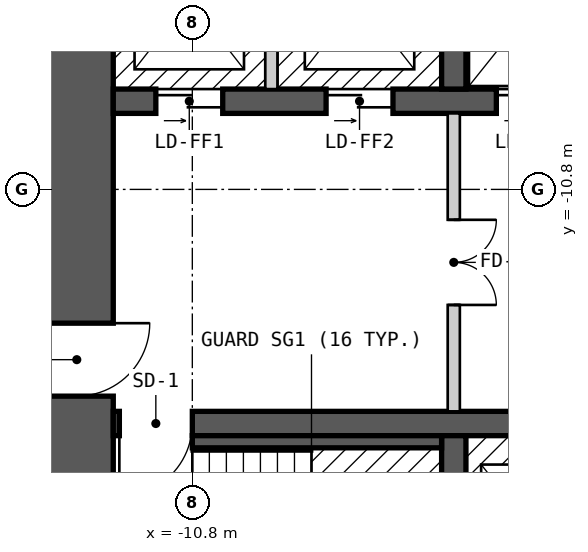
"""IFC4 building model, lengths in metres.
Left out: names, types, materials, properties, quantities, classifications, styles, units other than length and angle.
Written with IfcOpenShell. Run it as: python <this file> out.ifc"""

import sys

from ifc_helpers import new_model, si_unit, direction, frame, frame_2d, origin, place, context, subcontext, project, spatial, rectangle, extrude, element, fill, save


model = new_model("IFC4")
c1 = context("Model", 3, precision=1e-05, world=origin(), true_north=direction((0.0, 1.0)))
c2 = subcontext(c1, "Body", "Model", "MODEL_VIEW")
j1 = project(units=[si_unit("LENGTHUNIT", "METRE"), si_unit("PLANEANGLEUNIT", "RADIAN")], contexts=[c1])
p1 = place(None, origin())
s1 = spatial("IfcSite", under=j1, at=p1, CompositionType="ELEMENT")
p2 = place(p1, origin())
s2 = spatial("IfcBuilding", under=s1, at=p2, CompositionType="ELEMENT")
p3 = place(p2, frame((0.0, 0.0, 56.4)))
s3 = spatial("IfcBuildingStorey", under=s2, at=p3, CompositionType="ELEMENT", Elevation=56.4)
p4 = place(p3, frame((-12.7, -17.8, 0.0), z_axis=(0.0, 0.0, 1.0), x_axis=(0.0, 1.0, 0.0)))
e1 = element("IfcWall", 1, at=p4, inside=s3, PredefinedType="SHEAR", context=c2, shape_type="SweptSolid", body=[
    extrude(rectangle(XDim=11.6, YDim=1.2, at=frame_2d((5.8, 0.0))), origin(), (0.0, 0.0, 1.0), 2.7),
])
p5 = place(p4, frame((3.6, 0.0, 0.0)))
e2 = element("IfcOpeningElement", 2, at=p5, cuts=e1, PredefinedType="OPENING", context=c2, shape_type="SweptSolid", body=[
    extrude(rectangle(XDim=1.2, YDim=2.1, at=frame_2d((0.6, 1.05))), frame((0.0, 0.61, 0.0), z_axis=(0.0, -1.0, 0.0), x_axis=(1.0, 0.0, 0.0)), (0.0, 0.0, 1.0), 1.22),
])
p6 = place(p3, frame((-12.1, -14.65, 0.0), z_axis=(0.0, 0.0, 1.0), x_axis=(1.0, 0.0, 0.0)))
e3 = element("IfcWall", 3, at=p6, inside=s3, PredefinedType="SHEAR", context=c2, shape_type="SweptSolid", body=[
    extrude(rectangle(XDim=24.2, YDim=0.4, at=frame_2d((12.1, 0.0))), origin(), (0.0, 0.0, 1.0), 2.7),
])
p7 = place(p6, frame((1.3, 0.0, 0.0), z_axis=(0.0, 0.0, 1.0), x_axis=(-1.0, 0.0, 0.0)))
e4 = element("IfcOpeningElement", 4, at=p7, cuts=e3, PredefinedType="OPENING", context=c2, shape_type="SweptSolid", body=[
    extrude(rectangle(XDim=1.2, YDim=2.1, at=frame_2d((0.6, 1.05))), frame((0.0, 0.21, 0.0), z_axis=(0.0, -1.0, 0.0), x_axis=(1.0, 0.0, 0.0)), (0.0, 0.0, 1.0), 0.42),
])
p8 = place(p6, frame((24.15, 0.0, 0.0), z_axis=(0.0, 0.0, 1.0), x_axis=(-1.0, 0.0, 0.0)))
e5 = element("IfcOpeningElement", 5, at=p8, cuts=e3, PredefinedType="OPENING", context=c2, shape_type="SweptSolid", body=[
    extrude(rectangle(XDim=1.2, YDim=2.1, at=frame_2d((0.6, 1.05))), frame((0.0, 0.21, 0.0), z_axis=(0.0, -1.0, 0.0), x_axis=(1.0, 0.0, 0.0)), (0.0, 0.0, 1.0), 0.42),
])
p9 = place(p6, frame((16.6, 0.0, 0.0), z_axis=(0.0, 0.0, 1.0), x_axis=(-1.0, 0.0, 0.0)))
e6 = element("IfcOpeningElement", 6, at=p9, cuts=e3, PredefinedType="OPENING", context=c2, shape_type="SweptSolid", body=[
    extrude(rectangle(XDim=1.0, YDim=2.1, at=frame_2d((0.5, 1.05))), frame((0.0, 0.21, 0.0), z_axis=(0.0, -1.0, 0.0), x_axis=(1.0, 0.0, 0.0)), (0.0, 0.0, 1.0), 0.42),
])
p10 = place(p6, frame((18.35, 0.0, 0.0), z_axis=(0.0, 0.0, 1.0), x_axis=(-1.0, 0.0, 0.0)))
e7 = element("IfcOpeningElement", 7, at=p10, cuts=e3, PredefinedType="OPENING", context=c2, shape_type="SweptSolid", body=[
    extrude(rectangle(XDim=0.9, YDim=2.1, at=frame_2d((0.45, 1.05))), frame((0.0, 0.21, 0.0), z_axis=(0.0, -1.0, 0.0), x_axis=(1.0, 0.0, 0.0)), (0.0, 0.0, 1.0), 0.42),
])
p11 = place(p3, frame((-12.1, -9.35, 0.0), z_axis=(0.0, 0.0, 1.0), x_axis=(1.0, 0.0, 0.0)))
e8 = element("IfcWall", 8, at=p11, inside=s3, PredefinedType="SHEAR", context=c2, shape_type="SweptSolid", body=[
    extrude(rectangle(XDim=22.3, YDim=0.4, at=frame_2d((11.15, 0.0))), origin(), (0.0, 0.0, 1.0), 2.7),
])
p12 = place(p11, frame((0.7, 0.0, 0.0)))
e9 = element("IfcOpeningElement", 9, at=p12, cuts=e8, PredefinedType="OPENING", context=c2, shape_type="SweptSolid", body=[
    extrude(rectangle(XDim=1.1, YDim=2.1, at=frame_2d((0.55, 1.05))), frame((0.0, 0.21, 0.0), z_axis=(0.0, -1.0, 0.0), x_axis=(1.0, 0.0, 0.0)), (0.0, 0.0, 1.0), 0.42),
])
p13 = place(p11, frame((3.5, 0.0, 0.0)))
e10 = element("IfcOpeningElement", 10, at=p13, cuts=e8, PredefinedType="OPENING", context=c2, shape_type="SweptSolid", body=[
    extrude(rectangle(XDim=1.1, YDim=2.1, at=frame_2d((0.55, 1.05))), frame((0.0, 0.21, 0.0), z_axis=(0.0, -1.0, 0.0), x_axis=(1.0, 0.0, 0.0)), (0.0, 0.0, 1.0), 0.42),
])
p14 = place(p11, frame((6.3, 0.0, 0.0)))
e11 = element("IfcOpeningElement", 11, at=p14, cuts=e8, PredefinedType="OPENING", context=c2, shape_type="SweptSolid", body=[
    extrude(rectangle(XDim=1.1, YDim=2.1, at=frame_2d((0.55, 1.05))), frame((0.0, 0.21, 0.0), z_axis=(0.0, -1.0, 0.0), x_axis=(1.0, 0.0, 0.0)), (0.0, 0.0, 1.0), 0.42),
])
p15 = place(p11, frame((8.6, 0.0, 0.0)))
e12 = element("IfcOpeningElement", 12, at=p15, cuts=e8, PredefinedType="OPENING", context=c2, shape_type="SweptSolid", body=[
    extrude(rectangle(XDim=1.1, YDim=2.1, at=frame_2d((0.55, 1.05))), frame((0.0, 0.21, 0.0), z_axis=(0.0, -1.0, 0.0), x_axis=(1.0, 0.0, 0.0)), (0.0, 0.0, 1.0), 0.42),
])
p16 = place(p11, frame((10.9, 0.0, 0.0)))
e13 = element("IfcOpeningElement", 13, at=p16, cuts=e8, PredefinedType="OPENING", context=c2, shape_type="SweptSolid", body=[
    extrude(rectangle(XDim=1.1, YDim=2.1, at=frame_2d((0.55, 1.05))), frame((0.0, 0.21, 0.0), z_axis=(0.0, -1.0, 0.0), x_axis=(1.0, 0.0, 0.0)), (0.0, 0.0, 1.0), 0.42),
])
p17 = place(p11, frame((13.2, 0.0, 0.0)))
e14 = element("IfcOpeningElement", 14, at=p17, cuts=e8, PredefinedType="OPENING", context=c2, shape_type="SweptSolid", body=[
    extrude(rectangle(XDim=1.1, YDim=2.1, at=frame_2d((0.55, 1.05))), frame((0.0, 0.21, 0.0), z_axis=(0.0, -1.0, 0.0), x_axis=(1.0, 0.0, 0.0)), (0.0, 0.0, 1.0), 0.42),
])
p18 = place(p11, frame((15.5, 0.0, 0.0)))
e15 = element("IfcOpeningElement", 15, at=p18, cuts=e8, PredefinedType="OPENING", context=c2, shape_type="SweptSolid", body=[
    extrude(rectangle(XDim=1.1, YDim=2.1, at=frame_2d((0.55, 1.05))), frame((0.0, 0.21, 0.0), z_axis=(0.0, -1.0, 0.0), x_axis=(1.0, 0.0, 0.0)), (0.0, 0.0, 1.0), 0.42),
])
p19 = place(p11, frame((17.8, 0.0, 0.0)))
e16 = element("IfcOpeningElement", 16, at=p19, cuts=e8, PredefinedType="OPENING", context=c2, shape_type="SweptSolid", body=[
    extrude(rectangle(XDim=1.1, YDim=2.1, at=frame_2d((0.55, 1.05))), frame((0.0, 0.21, 0.0), z_axis=(0.0, -1.0, 0.0), x_axis=(1.0, 0.0, 0.0)), (0.0, 0.0, 1.0), 0.42),
])
p20 = place(p11, frame((20.2, 0.0, 0.0)))
e17 = element("IfcOpeningElement", 17, at=p20, cuts=e8, PredefinedType="OPENING", context=c2, shape_type="SweptSolid", body=[
    extrude(rectangle(XDim=1.1, YDim=2.1, at=frame_2d((0.55, 1.05))), frame((0.0, 0.21, 0.0), z_axis=(0.0, -1.0, 0.0), x_axis=(1.0, 0.0, 0.0)), (0.0, 0.0, 1.0), 0.42),
])
for number, where, z_axis, x_axis in (
    (18, (-6.5, -17.8, 0.0), (0.0, 0.0, 1.0), (0.0, 1.0, 0.0)),
    (19, (-6.5, -9.15, 0.0), (0.0, 0.0, 1.0), (0.0, 1.0, 0.0)),
):
    element("IfcWall", number, at=place(p3, frame(where, z_axis=z_axis, x_axis=x_axis)), inside=s3, PredefinedType="SHEAR", context=c2, shape_type="SweptSolid", body=[
        extrude(rectangle(XDim=2.95, YDim=0.4, at=frame_2d((1.475, 0.0))), origin(), (0.0, 0.0, 1.0), 2.7),
    ])
p21 = place(p3, frame((-10.8, -14.95, 0.0), z_axis=(0.0, 0.0, 1.0), x_axis=(1.0, 0.0, 0.0)))
e20 = element("IfcWall", 20, at=p21, inside=s3, PredefinedType="SOLIDWALL", context=c2, shape_type="SweptSolid", body=[
    extrude(rectangle(XDim=4.1, YDim=0.2, at=frame_2d((2.05, 0.0))), origin(), (0.0, 0.0, 1.0), 2.7),
])
p22 = place(p3, frame((-9.5, -9.15, 0.0), z_axis=(0.0, 0.0, 1.0), x_axis=(0.0, 1.0, 0.0)))
e21 = element("IfcWall", 21, at=p22, inside=s3, PredefinedType="SOLIDWALL", context=c2, shape_type="SweptSolid", body=[
    extrude(rectangle(XDim=2.95, YDim=0.2, at=frame_2d((1.475, 0.0))), origin(), (0.0, 0.0, 1.0), 2.7),
])
p23 = place(p3, frame((-6.5, -14.45, 0.0), z_axis=(0.0, 0.0, 1.0), x_axis=(0.0, 1.0, 0.0)))
e22 = element("IfcWall", 22, at=p23, inside=s3, PredefinedType="PARTITIONING", context=c2, shape_type="SweptSolid", body=[
    extrude(rectangle(XDim=4.9, YDim=0.2, at=frame_2d((2.45, 0.0))), origin(), (0.0, 0.0, 1.0), 2.7),
])
p24 = place(p23, frame((3.15, 0.0, 0.0), z_axis=(0.0, 0.0, 1.0), x_axis=(-1.0, 0.0, 0.0)))
e23 = element("IfcOpeningElement", 23, at=p24, cuts=e22, PredefinedType="OPENING", context=c2, shape_type="SweptSolid", body=[
    extrude(rectangle(XDim=1.4, YDim=2.1, at=frame_2d((0.7, 1.05))), frame((0.0, 0.11, 0.0), z_axis=(0.0, -1.0, 0.0), x_axis=(1.0, 0.0, 0.0)), (0.0, 0.0, 1.0), 0.22),
])
p25 = place(p12, origin())
e24 = element("IfcDoor", 24, at=p25, inside=s3, OperationType="DOUBLE_DOOR_SLIDING", PredefinedType="DOOR", context=c2, shape_type="SweptSolid", body=[
    extrude(rectangle(XDim=1.1, YDim=2.1, at=frame_2d((0.55, 1.05))), frame((0.0, 0.025, 0.0), z_axis=(0.0, -1.0, 0.0), x_axis=(1.0, 0.0, 0.0)), (0.0, 0.0, 1.0), 0.05),
])
fill(e9, e24)
p26 = place(p13, origin())
e25 = element("IfcDoor", 25, at=p26, inside=s3, OperationType="DOUBLE_DOOR_SLIDING", PredefinedType="DOOR", context=c2, shape_type="SweptSolid", body=[
    extrude(rectangle(XDim=1.1, YDim=2.1, at=frame_2d((0.55, 1.05))), frame((0.0, 0.025, 0.0), z_axis=(0.0, -1.0, 0.0), x_axis=(1.0, 0.0, 0.0)), (0.0, 0.0, 1.0), 0.05),
])
fill(e10, e25)
p27 = place(p14, origin())
e26 = element("IfcDoor", 26, at=p27, inside=s3, OperationType="DOUBLE_DOOR_SLIDING", PredefinedType="DOOR", context=c2, shape_type="SweptSolid", body=[
    extrude(rectangle(XDim=1.1, YDim=2.1, at=frame_2d((0.55, 1.05))), frame((0.0, 0.025, 0.0), z_axis=(0.0, -1.0, 0.0), x_axis=(1.0, 0.0, 0.0)), (0.0, 0.0, 1.0), 0.05),
])
fill(e11, e26)
p28 = place(p7, origin())
e27 = element("IfcDoor", 27, at=p28, inside=s3, OperationType="SINGLE_SWING_RIGHT", PredefinedType="DOOR", context=c2, shape_type="SweptSolid", body=[
    extrude(rectangle(XDim=1.2, YDim=2.1, at=frame_2d((0.6, 1.05))), frame((0.0, 0.025, 0.0), z_axis=(0.0, -1.0, 0.0), x_axis=(1.0, 0.0, 0.0)), (0.0, 0.0, 1.0), 0.05),
])
fill(e4, e27)
p29 = place(p5, origin())
e28 = element("IfcDoor", 28, at=p29, inside=s3, OperationType="SINGLE_SWING_RIGHT", PredefinedType="DOOR", context=c2, shape_type="SweptSolid", body=[
    extrude(rectangle(XDim=1.2, YDim=2.1, at=frame_2d((0.6, 1.05))), frame((0.0, 0.025, 0.0), z_axis=(0.0, -1.0, 0.0), x_axis=(1.0, 0.0, 0.0)), (0.0, 0.0, 1.0), 0.05),
])
fill(e2, e28)
p30 = place(p24, origin())
e29 = element("IfcDoor", 29, at=p30, inside=s3, OperationType="DOUBLE_DOOR_SINGLE_SWING", PredefinedType="DOOR", context=c2, shape_type="SweptSolid", body=[
    extrude(rectangle(XDim=1.4, YDim=2.1, at=frame_2d((0.7, 1.05))), frame((0.0, 0.025, 0.0), z_axis=(0.0, -1.0, 0.0), x_axis=(1.0, 0.0, 0.0)), (0.0, 0.0, 1.0), 0.05),
])
fill(e23, e29)
save(model, sys.argv[1])
